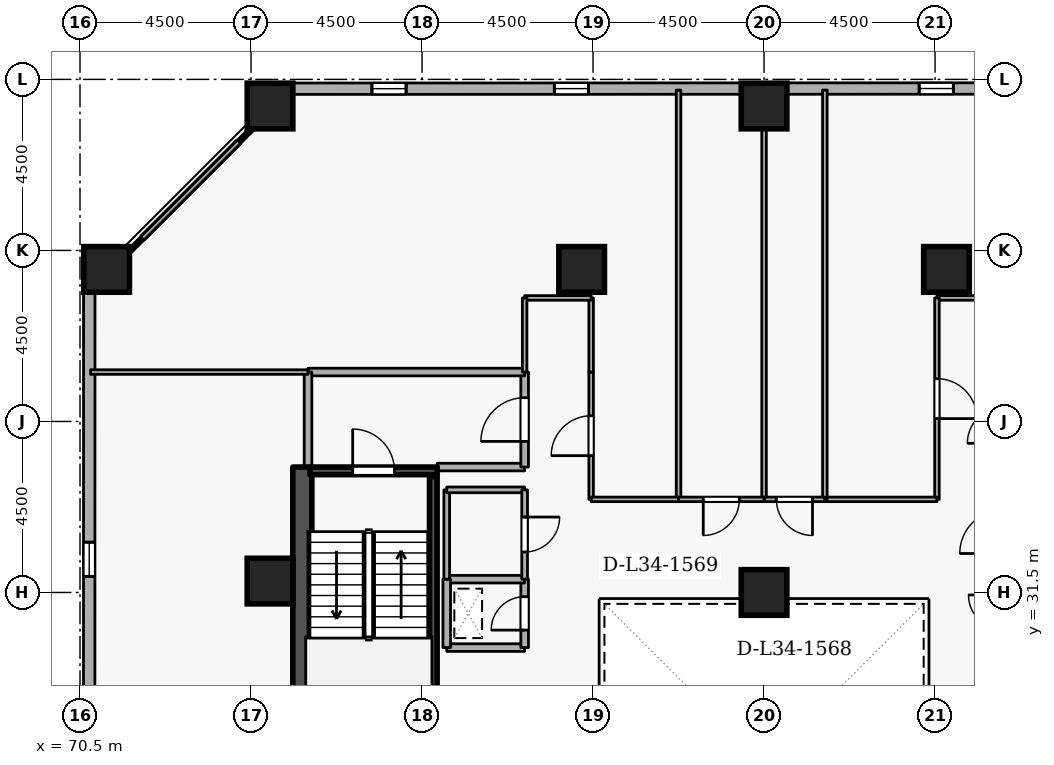
"""IFC4 building model, lengths in metres.
Left out: names, types, materials, properties, quantities, classifications, styles, units other than length and angle.
Written with IfcOpenShell. Run it as: python <this file> out.ifc"""

import sys

from ifc_helpers import new_model, si_unit, direction, frame, frame_2d, origin, origin_2d, place, context, subcontext, project, spatial, rectangle, extrude, element, fill, save


model = new_model("IFC4")
c1 = context("Model", 3, precision=1e-05, world=origin(), true_north=direction((0.0, 1.0)))
c2 = subcontext(c1, "Body", "Model", "MODEL_VIEW")
j1 = project(units=[si_unit("LENGTHUNIT", "METRE"), si_unit("PLANEANGLEUNIT", "RADIAN")], contexts=[c1])
p1 = place(None, origin())
s1 = spatial("IfcSite", under=j1, at=p1, CompositionType="ELEMENT")
p2 = place(p1, origin())
s2 = spatial("IfcBuilding", under=s1, at=p2, CompositionType="ELEMENT")
p3 = place(p2, frame((0.0, 0.0, 130.5)))
s3 = spatial("IfcBuildingStorey", under=s2, at=p3, CompositionType="ELEMENT", Elevation=130.5)
p4 = place(p3, frame((76.35, 19.2, 0.0), z_axis=(0.0, 0.0, 1.0), x_axis=(0.0, 1.0, 0.0)))
e1 = element("IfcWall", 1, at=p4, inside=s3, PredefinedType="SHEAR", context=c2, shape_type="SweptSolid", body=[
    extrude(rectangle(XDim=15.6, YDim=0.5, at=frame_2d((7.8, 0.0))), origin(), (0.0, 0.0, 1.0), 3.6),
])
for number, where, z_axis, x_axis in (
    (2, (88.5, 44.3, 0.0), (0.0, 0.0, 1.0), (1.0, 0.0, 0.0)),
    (3, (75.5, 44.3, 0.0), (0.0, 0.0, 1.0), (1.0, 0.0, 0.0)),
    (4, (71.2, 40.0, 0.0), (0.0, 0.0, 1.0), (1.0, 0.0, 0.0)),
    (5, (93.3, 40.0, 0.0), (0.0, 0.0, 1.0), (1.0, 0.0, 0.0)),
    (6, (83.7, 40.0, 0.0), (0.0, 0.0, 1.0), (1.0, 0.0, 0.0)),
    (7, (75.5, 31.8, 0.0), (0.0, 0.0, 1.0), (1.0, 0.0, 0.0)),
    (8, (88.5, 31.5, 0.0), (0.0, 0.0, 1.0), (1.0, 0.0, 0.0)),
):
    element("IfcColumn", number, at=place(p3, frame(where, z_axis=z_axis, x_axis=x_axis)), inside=s3, PredefinedType="COLUMN", context=c2, shape_type="SweptSolid", body=[
        extrude(rectangle(XDim=1.2, YDim=1.2, at=origin_2d()), origin(), (0.0, 0.0, 1.0), 3.6),
    ])
p5 = place(p3, frame((109.681, 44.765, 0.0), z_axis=(0.0, 0.0, 1.0), x_axis=(-0.999999963872, -0.000268805477, 0.0)))
e9 = element("IfcWall", 9, at=p5, inside=s3, PredefinedType="STANDARD", context=c2, shape_type="SweptSolid", body=[
    extrude(rectangle(XDim=33.605, YDim=0.3, at=frame_2d((16.802, 0.0))), origin(), (0.0, 0.0, 1.0), 2.7),
])
p6 = place(p5, frame((1.8, 0.0, 0.72)))
e10 = element("IfcOpeningElement", 10, at=p6, cuts=e9, PredefinedType="OPENING", context=c2, shape_type="SweptSolid", body=[
    extrude(rectangle(XDim=0.9, YDim=1.75, at=frame_2d((0.45, 0.875))), frame((0.0, 0.16, 0.0), z_axis=(0.0, -1.0, 0.0), x_axis=(1.0, 0.0, 0.0)), (0.0, 0.0, 1.0), 0.32),
])
p7 = place(p5, frame((11.4, 0.0, 0.72)))
e11 = element("IfcOpeningElement", 11, at=p7, cuts=e9, PredefinedType="OPENING", context=c2, shape_type="SweptSolid", body=[
    extrude(rectangle(XDim=0.9, YDim=1.75, at=frame_2d((0.45, 0.875))), frame((0.0, 0.16, 0.0), z_axis=(0.0, -1.0, 0.0), x_axis=(1.0, 0.0, 0.0)), (0.0, 0.0, 1.0), 0.32),
])
p8 = place(p5, frame((16.2, 0.0, 0.72)))
e12 = element("IfcOpeningElement", 12, at=p8, cuts=e9, PredefinedType="OPENING", context=c2, shape_type="SweptSolid", body=[
    extrude(rectangle(XDim=0.9, YDim=1.75, at=frame_2d((0.45, 0.875))), frame((0.0, 0.16, 0.0), z_axis=(0.0, -1.0, 0.0), x_axis=(1.0, 0.0, 0.0)), (0.0, 0.0, 1.0), 0.32),
])
p9 = place(p5, frame((25.8, 0.0, 0.72)))
e13 = element("IfcOpeningElement", 13, at=p9, cuts=e9, PredefinedType="OPENING", context=c2, shape_type="SweptSolid", body=[
    extrude(rectangle(XDim=0.9, YDim=1.75, at=frame_2d((0.45, 0.875))), frame((0.0, 0.16, 0.0), z_axis=(0.0, -1.0, 0.0), x_axis=(1.0, 0.0, 0.0)), (0.0, 0.0, 1.0), 0.32),
])
p10 = place(p5, frame((30.6, 0.0, 0.72)))
e14 = element("IfcOpeningElement", 14, at=p10, cuts=e9, PredefinedType="OPENING", context=c2, shape_type="SweptSolid", body=[
    extrude(rectangle(XDim=0.9, YDim=1.75, at=frame_2d((0.45, 0.875))), frame((0.0, 0.16, 0.0), z_axis=(0.0, -1.0, 0.0), x_axis=(1.0, 0.0, 0.0)), (0.0, 0.0, 1.0), 0.32),
])
p11 = place(p3, frame((70.744, 39.424, 0.0), z_axis=(0.0, 0.0, 1.0), x_axis=(-0.000268805477, -0.999999963872, 0.0)))
e15 = element("IfcWall", 15, at=p11, inside=s3, PredefinedType="STANDARD", context=c2, shape_type="SweptSolid", body=[
    extrude(rectangle(XDim=33.605, YDim=0.3, at=frame_2d((16.802, 0.0))), origin(), (0.0, 0.0, 1.0), 2.7),
])
p12 = place(p11, frame((6.6, 0.0, 0.72)))
e16 = element("IfcOpeningElement", 16, at=p12, cuts=e15, PredefinedType="OPENING", context=c2, shape_type="SweptSolid", body=[
    extrude(rectangle(XDim=0.9, YDim=1.75, at=frame_2d((0.45, 0.875))), frame((0.0, 0.16, 0.0), z_axis=(0.0, -1.0, 0.0), x_axis=(1.0, 0.0, 0.0)), (0.0, 0.0, 1.0), 0.32),
])
p13 = place(p11, frame((16.2, 0.0, 0.72)))
e17 = element("IfcOpeningElement", 17, at=p13, cuts=e15, PredefinedType="OPENING", context=c2, shape_type="SweptSolid", body=[
    extrude(rectangle(XDim=0.9, YDim=1.75, at=frame_2d((0.45, 0.875))), frame((0.0, 0.16, 0.0), z_axis=(0.0, -1.0, 0.0), x_axis=(1.0, 0.0, 0.0)), (0.0, 0.0, 1.0), 0.32),
])
p14 = place(p11, frame((21.0, 0.0, 0.72)))
e18 = element("IfcOpeningElement", 18, at=p14, cuts=e15, PredefinedType="OPENING", context=c2, shape_type="SweptSolid", body=[
    extrude(rectangle(XDim=0.9, YDim=1.75, at=frame_2d((0.45, 0.875))), frame((0.0, 0.16, 0.0), z_axis=(0.0, -1.0, 0.0), x_axis=(1.0, 0.0, 0.0)), (0.0, 0.0, 1.0), 0.32),
])
p15 = place(p11, frame((30.6, 0.0, 0.72)))
e19 = element("IfcOpeningElement", 19, at=p15, cuts=e15, PredefinedType="OPENING", context=c2, shape_type="SweptSolid", body=[
    extrude(rectangle(XDim=0.9, YDim=1.75, at=frame_2d((0.45, 0.875))), frame((0.0, 0.16, 0.0), z_axis=(0.0, -1.0, 0.0), x_axis=(1.0, 0.0, 0.0)), (0.0, 0.0, 1.0), 0.32),
])
p16 = place(p3, frame((76.55, 34.7, 0.0), z_axis=(0.0, 0.0, 1.0), x_axis=(1.0, 0.0, 0.0)))
e20 = element("IfcWall", 20, at=p16, inside=s3, PredefinedType="SHEAR", context=c2, shape_type="SweptSolid", body=[
    extrude(rectangle(XDim=3.35, YDim=0.2, at=frame_2d((1.675, 0.0))), origin(), (0.0, 0.0, 1.0), 3.6),
])
p17 = place(p16, frame((1.125, 0.0, 0.0)))
e21 = element("IfcOpeningElement", 21, at=p17, cuts=e20, PredefinedType="OPENING", context=c2, shape_type="SweptSolid", body=[
    extrude(rectangle(XDim=1.1, YDim=2.1, at=frame_2d((0.55, 1.05))), frame((0.0, 0.11, 0.0), z_axis=(0.0, -1.0, 0.0), x_axis=(1.0, 0.0, 0.0)), (0.0, 0.0, 1.0), 0.22),
])
p18 = place(p3, frame((79.797, 27.45, 0.0), z_axis=(0.0, 0.0, 1.0), x_axis=(0.0, 1.0, 0.0)))
e22 = element("IfcWall", 22, at=p18, inside=s3, PredefinedType="SHEAR", context=c2, shape_type="SweptSolid", body=[
    extrude(rectangle(XDim=7.1, YDim=0.2, at=frame_2d((3.55, 0.0))), origin(), (0.0, 0.0, 1.0), 3.6),
])
p19 = place(p3, frame((79.9, 34.8, 0.0), z_axis=(0.0, 0.0, 1.0), x_axis=(1.0, 0.0, 0.0)))
e23 = element("IfcWall", 23, at=p19, inside=s3, PredefinedType="STANDARD", context=c2, shape_type="SweptSolid", body=[
    extrude(rectangle(XDim=2.3, YDim=0.2, at=frame_2d((1.15, 0.0))), origin(), (0.0, 0.0, 1.0), 2.545),
])
p20 = place(p3, frame((82.2, 34.8, 0.0), z_axis=(0.0, 0.0, 1.0), x_axis=(0.0, 1.0, 0.0)))
e24 = element("IfcWall", 24, at=p20, inside=s3, PredefinedType="STANDARD", context=c2, shape_type="SweptSolid", body=[
    extrude(rectangle(XDim=2.5, YDim=0.2, at=frame_2d((1.25, 0.0))), origin(), (0.0, 0.0, 1.0), 3.34),
])
p21 = place(p20, frame((0.675, 0.0, 0.0)))
e25 = element("IfcOpeningElement", 25, at=p21, cuts=e24, PredefinedType="OPENING", context=c2, shape_type="SweptSolid", body=[
    extrude(rectangle(XDim=1.15, YDim=2.1, at=frame_2d((0.575, 1.05))), frame((0.0, 0.11, 0.0), z_axis=(0.0, -1.0, 0.0), x_axis=(1.0, 0.0, 0.0)), (0.0, 0.0, 1.0), 0.22),
])
p22 = place(p3, frame((82.2, 37.3, 0.0), z_axis=(0.0, 0.0, 1.0), x_axis=(-1.0, 0.0, 0.0)))
e26 = element("IfcWall", 26, at=p22, inside=s3, PredefinedType="STANDARD", context=c2, shape_type="SweptSolid", body=[
    extrude(rectangle(XDim=5.7, YDim=0.2, at=frame_2d((2.85, 0.0))), origin(), (0.0, 0.0, 1.0), 3.34),
])
p23 = place(p3, frame((76.5, 37.3, 0.0), z_axis=(0.0, 0.0, 1.0), x_axis=(0.0, -1.0, 0.0)))
e27 = element("IfcWall", 27, at=p23, inside=s3, PredefinedType="STANDARD", context=c2, shape_type="SweptSolid", body=[
    extrude(rectangle(XDim=2.5, YDim=0.2, at=frame_2d((1.25, 0.0))), origin(), (0.0, 0.0, 1.0), 3.34),
])
p24 = place(p3, frame((80.15, 30.05, 0.0), z_axis=(0.0, 0.0, 1.0), x_axis=(1.0, 0.0, 0.0)))
e28 = element("IfcWall", 28, at=p24, inside=s3, PredefinedType="STANDARD", context=c2, shape_type="SweptSolid", body=[
    extrude(rectangle(XDim=2.05, YDim=0.2, at=frame_2d((1.025, 0.0))), origin(), (0.0, 0.0, 1.0), 3.34),
])
p25 = place(p3, frame((82.2, 30.05, 0.0), z_axis=(0.0, 0.0, 1.0), x_axis=(0.0, 1.0, 0.0)))
e29 = element("IfcWall", 29, at=p25, inside=s3, PredefinedType="STANDARD", context=c2, shape_type="SweptSolid", body=[
    extrude(rectangle(XDim=1.8, YDim=0.2, at=frame_2d((0.9, 0.0))), origin(), (0.0, 0.0, 1.0), 3.34),
])
p26 = place(p25, frame((0.46, 0.0, 0.0)))
e30 = element("IfcOpeningElement", 30, at=p26, cuts=e29, PredefinedType="OPENING", context=c2, shape_type="SweptSolid", body=[
    extrude(rectangle(XDim=0.88, YDim=2.04, at=frame_2d((0.44, 1.02))), frame((0.0, 0.11, 0.0), z_axis=(0.0, -1.0, 0.0), x_axis=(1.0, 0.0, 0.0)), (0.0, 0.0, 1.0), 0.22),
])
p27 = place(p3, frame((82.2, 31.85, 0.0), z_axis=(0.0, 0.0, 1.0), x_axis=(-1.0, 0.0, 0.0)))
e31 = element("IfcWall", 31, at=p27, inside=s3, PredefinedType="STANDARD", context=c2, shape_type="SweptSolid", body=[
    extrude(rectangle(XDim=2.05, YDim=0.2, at=frame_2d((1.025, 0.0))), origin(), (0.0, 0.0, 1.0), 3.34),
])
p28 = place(p3, frame((80.15, 31.85, 0.0), z_axis=(0.0, 0.0, 1.0), x_axis=(0.0, -1.0, 0.0)))
e32 = element("IfcWall", 32, at=p28, inside=s3, PredefinedType="STANDARD", context=c2, shape_type="SweptSolid", body=[
    extrude(rectangle(XDim=1.8, YDim=0.2, at=frame_2d((0.9, 0.0))), origin(), (0.0, 0.0, 1.0), 3.34),
])
p29 = place(p3, frame((80.15, 31.85, 0.0), z_axis=(0.0, 0.0, 1.0), x_axis=(0.0, 1.0, 0.0)))
e33 = element("IfcWall", 33, at=p29, inside=s3, PredefinedType="PARTITIONING", context=c2, shape_type="SweptSolid", body=[
    extrude(rectangle(XDim=2.35, YDim=0.15, at=frame_2d((1.175, 0.0))), origin(), (0.0, 0.0, 1.0), 3.34),
])
p30 = place(p3, frame((80.15, 34.2, 0.0), z_axis=(0.0, 0.0, 1.0), x_axis=(1.0, 0.0, 0.0)))
e34 = element("IfcWall", 34, at=p30, inside=s3, PredefinedType="PARTITIONING", context=c2, shape_type="SweptSolid", body=[
    extrude(rectangle(XDim=2.05, YDim=0.15, at=frame_2d((1.025, 0.0))), origin(), (0.0, 0.0, 1.0), 2.545),
])
p31 = place(p3, frame((82.2, 34.2, 0.0), z_axis=(0.0, 0.0, 1.0), x_axis=(0.0, -1.0, 0.0)))
e35 = element("IfcWall", 35, at=p31, inside=s3, PredefinedType="PARTITIONING", context=c2, shape_type="SweptSolid", body=[
    extrude(rectangle(XDim=2.35, YDim=0.15, at=frame_2d((1.175, 0.0))), origin(), (0.0, 0.0, 1.0), 3.34),
])
p32 = place(p31, frame((0.715, 0.0, 0.0)))
e36 = element("IfcOpeningElement", 36, at=p32, cuts=e35, PredefinedType="OPENING", context=c2, shape_type="SweptSolid", body=[
    extrude(rectangle(XDim=0.92, YDim=2.08, at=frame_2d((0.46, 1.04))), frame((0.0, 0.085, 0.0), z_axis=(0.0, -1.0, 0.0), x_axis=(1.0, 0.0, 0.0)), (0.0, 0.0, 1.0), 0.17),
])
p33 = place(p3, frame((94.8, 39.25, 0.0), z_axis=(0.0, 0.0, 1.0), x_axis=(-1.0, 0.0, 0.0)))
e37 = element("IfcWall", 37, at=p33, inside=s3, PredefinedType="PARTITIONING", context=c2, shape_type="SweptSolid", body=[
    extrude(rectangle(XDim=1.75, YDim=0.12, at=frame_2d((0.875, 0.0))), origin(), (0.0, 0.0, 1.0), 3.34),
])
p34 = place(p3, frame((93.05, 39.25, 0.0), z_axis=(0.0, 0.0, 1.0), x_axis=(0.0, -1.0, 0.0)))
e38 = element("IfcWall", 38, at=p34, inside=s3, PredefinedType="PARTITIONING", context=c2, shape_type="SweptSolid", body=[
    extrude(rectangle(XDim=5.3, YDim=0.12, at=frame_2d((2.65, 0.0))), origin(), (0.0, 0.0, 1.0), 3.34),
])
p35 = place(p34, frame((2.125, 0.0, 0.0)))
e39 = element("IfcOpeningElement", 39, at=p35, cuts=e38, PredefinedType="OPENING", context=c2, shape_type="SweptSolid", body=[
    extrude(rectangle(XDim=1.05, YDim=2.1, at=frame_2d((0.525, 1.05))), frame((0.0, 0.07, 0.0), z_axis=(0.0, -1.0, 0.0), x_axis=(1.0, 0.0, 0.0)), (0.0, 0.0, 1.0), 0.14),
])
p36 = place(p3, frame((93.05, 33.95, 0.0), z_axis=(0.0, 0.0, 1.0), x_axis=(-1.0, 0.0, 0.0)))
e40 = element("IfcWall", 40, at=p36, inside=s3, PredefinedType="PARTITIONING", context=c2, shape_type="SweptSolid", body=[
    extrude(rectangle(XDim=2.95, YDim=0.12, at=frame_2d((1.475, 0.0))), origin(), (0.0, 0.0, 1.0), 3.34),
])
p37 = place(p3, frame((90.1, 33.95, 0.0), z_axis=(0.0, 0.0, 1.0), x_axis=(0.0, 1.0, 0.0)))
e41 = element("IfcWall", 41, at=p37, inside=s3, PredefinedType="PARTITIONING", context=c2, shape_type="SweptSolid", body=[
    extrude(rectangle(XDim=10.77, YDim=0.12, at=frame_2d((5.385, 0.0))), origin(), (0.0, 0.0, 1.0), 3.34),
])
p38 = place(p3, frame((88.5, 33.95, 0.0), z_axis=(0.0, 0.0, 1.0), x_axis=(0.0, 1.0, 0.0)))
e42 = element("IfcWall", 42, at=p38, inside=s3, PredefinedType="PARTITIONING", context=c2, shape_type="SweptSolid", body=[
    extrude(rectangle(XDim=10.77, YDim=0.12, at=frame_2d((5.385, 0.0))), origin(), (0.0, 0.0, 1.0), 2.878),
])
p39 = place(p3, frame((90.1, 33.95, 0.0), z_axis=(0.0, 0.0, 1.0), x_axis=(-1.0, 0.0, 0.0)))
e43 = element("IfcWall", 43, at=p39, inside=s3, PredefinedType="PARTITIONING", context=c2, shape_type="SweptSolid", body=[
    extrude(rectangle(XDim=1.6, YDim=0.12, at=frame_2d((0.8, 0.0))), origin(), (0.0, 0.0, 1.0), 3.34),
])
p40 = place(p39, frame((0.325, 0.0, 0.0)))
e44 = element("IfcOpeningElement", 44, at=p40, cuts=e43, PredefinedType="OPENING", context=c2, shape_type="SweptSolid", body=[
    extrude(rectangle(XDim=0.95, YDim=2.1, at=frame_2d((0.475, 1.05))), frame((0.0, 0.07, 0.0), z_axis=(0.0, -1.0, 0.0), x_axis=(1.0, 0.0, 0.0)), (0.0, 0.0, 1.0), 0.14),
])
p41 = place(p3, frame((86.25, 33.95, 0.0), z_axis=(0.0, 0.0, 1.0), x_axis=(0.0, 1.0, 0.0)))
e45 = element("IfcWall", 45, at=p41, inside=s3, PredefinedType="PARTITIONING", context=c2, shape_type="SweptSolid", body=[
    extrude(rectangle(XDim=10.77, YDim=0.12, at=frame_2d((5.385, 0.0))), origin(), (0.0, 0.0, 1.0), 3.34),
])
p42 = place(p3, frame((88.5, 33.95, 0.0), z_axis=(0.0, 0.0, 1.0), x_axis=(-1.0, 0.0, 0.0)))
e46 = element("IfcWall", 46, at=p42, inside=s3, PredefinedType="PARTITIONING", context=c2, shape_type="SweptSolid", body=[
    extrude(rectangle(XDim=2.25, YDim=0.12, at=frame_2d((1.125, 0.0))), origin(), (0.0, 0.0, 1.0), 3.34),
])
p43 = place(p42, frame((0.65, 0.0, 0.0)))
e47 = element("IfcOpeningElement", 47, at=p43, cuts=e46, PredefinedType="OPENING", context=c2, shape_type="SweptSolid", body=[
    extrude(rectangle(XDim=0.95, YDim=2.1, at=frame_2d((0.475, 1.05))), frame((0.0, 0.07, 0.0), z_axis=(0.0, -1.0, 0.0), x_axis=(1.0, 0.0, 0.0)), (0.0, 0.0, 1.0), 0.14),
])
p44 = place(p3, frame((83.95, 33.95, 0.0), z_axis=(0.0, 0.0, 1.0), x_axis=(0.0, 1.0, 0.0)))
e48 = element("IfcWall", 48, at=p44, inside=s3, PredefinedType="PARTITIONING", context=c2, shape_type="SweptSolid", body=[
    extrude(rectangle(XDim=3.35, YDim=0.12, at=frame_2d((1.675, 0.0))), origin(), (0.0, 0.0, 1.0), 3.34),
])
p45 = place(p44, frame((1.15, 0.0, 0.0)))
e49 = element("IfcOpeningElement", 49, at=p45, cuts=e48, PredefinedType="OPENING", context=c2, shape_type="SweptSolid", body=[
    extrude(rectangle(XDim=1.05, YDim=2.1, at=frame_2d((0.525, 1.05))), frame((0.0, 0.07, 0.0), z_axis=(0.0, -1.0, 0.0), x_axis=(1.0, 0.0, 0.0)), (0.0, 0.0, 1.0), 0.14),
])
p46 = place(p3, frame((83.95, 37.3, 0.0), z_axis=(0.0, 0.0, 1.0), x_axis=(0.0, 1.0, 0.0)))
e50 = element("IfcWall", 50, at=p46, inside=s3, PredefinedType="PARTITIONING", context=c2, shape_type="SweptSolid", body=[
    extrude(rectangle(XDim=1.95, YDim=0.12, at=frame_2d((0.975, 0.0))), origin(), (0.0, 0.0, 1.0), 3.34),
])
p47 = place(p3, frame((83.95, 39.25, 0.0), z_axis=(0.0, 0.0, 1.0), x_axis=(-1.0, 0.0, 0.0)))
e51 = element("IfcWall", 51, at=p47, inside=s3, PredefinedType="PARTITIONING", context=c2, shape_type="SweptSolid", body=[
    extrude(rectangle(XDim=1.75, YDim=0.12, at=frame_2d((0.875, 0.0))), origin(), (0.0, 0.0, 1.0), 3.34),
])
p48 = place(p3, frame((82.2, 39.25, 0.0), z_axis=(0.0, 0.0, 1.0), x_axis=(0.0, -1.0, 0.0)))
e52 = element("IfcWall", 52, at=p48, inside=s3, PredefinedType="PARTITIONING", context=c2, shape_type="SweptSolid", body=[
    extrude(rectangle(XDim=1.95, YDim=0.12, at=frame_2d((0.975, 0.0))), origin(), (0.0, 0.0, 1.0), 3.34),
])
p49 = place(p3, frame((76.5, 37.3, 0.0), z_axis=(0.0, 0.0, 1.0), x_axis=(-1.0, 0.0, 0.0)))
e53 = element("IfcWall", 53, at=p49, inside=s3, PredefinedType="PARTITIONING", context=c2, shape_type="SweptSolid", body=[
    extrude(rectangle(XDim=5.72, YDim=0.12, at=frame_2d((2.86, 0.0))), origin(), (0.0, 0.0, 1.0), 3.34),
])
p50 = place(p3, frame((70.78, 39.456, 0.0), z_axis=(0.0, 0.0, 1.0), x_axis=(0.707106781187, 0.707106781187, 0.0)))
e54 = element("IfcWall", 54, at=p50, inside=s3, PredefinedType="PARTITIONING", context=c2, shape_type="SweptSolid", body=[
    extrude(rectangle(XDim=7.444, YDim=0.12, at=frame_2d((3.722, 0.0))), origin(), (0.0, 0.0, 1.0), 3.34),
])
p51 = place(p3, frame((86.25, 33.95, 0.0), z_axis=(0.0, 0.0, 1.0), x_axis=(-1.0, 0.0, 0.0)))
e55 = element("IfcWall", 55, at=p51, inside=s3, PredefinedType="PARTITIONING", context=c2, shape_type="SweptSolid", body=[
    extrude(rectangle(XDim=2.3, YDim=0.12, at=frame_2d((1.15, 0.0))), origin(), (0.0, 0.0, 1.0), 3.34),
])
p52 = place(p8, origin())
e56 = element("IfcWindow", 56, at=p52, inside=s3, PartitioningType="SINGLE_PANEL", PredefinedType="WINDOW", context=c2, shape_type="SweptSolid", body=[
    extrude(rectangle(XDim=0.9, YDim=1.75, at=frame_2d((0.45, 0.875))), frame((0.0, 0.03, 0.0), z_axis=(0.0, -1.0, 0.0), x_axis=(1.0, 0.0, 0.0)), (0.0, 0.0, 1.0), 0.06),
])
fill(e12, e56)
p53 = place(p9, origin())
e57 = element("IfcWindow", 57, at=p53, inside=s3, PartitioningType="SINGLE_PANEL", PredefinedType="WINDOW", context=c2, shape_type="SweptSolid", body=[
    extrude(rectangle(XDim=0.9, YDim=1.75, at=frame_2d((0.45, 0.875))), frame((0.0, 0.03, 0.0), z_axis=(0.0, -1.0, 0.0), x_axis=(1.0, 0.0, 0.0)), (0.0, 0.0, 1.0), 0.06),
])
fill(e13, e57)
p54 = place(p10, origin())
e58 = element("IfcWindow", 58, at=p54, inside=s3, PartitioningType="SINGLE_PANEL", PredefinedType="WINDOW", context=c2, shape_type="SweptSolid", body=[
    extrude(rectangle(XDim=0.9, YDim=1.75, at=frame_2d((0.45, 0.875))), frame((0.0, 0.03, 0.0), z_axis=(0.0, -1.0, 0.0), x_axis=(1.0, 0.0, 0.0)), (0.0, 0.0, 1.0), 0.06),
])
fill(e14, e58)
p55 = place(p12, origin())
e59 = element("IfcWindow", 59, at=p55, inside=s3, PartitioningType="SINGLE_PANEL", PredefinedType="WINDOW", context=c2, shape_type="SweptSolid", body=[
    extrude(rectangle(XDim=0.9, YDim=1.75, at=frame_2d((0.45, 0.875))), frame((0.0, 0.03, 0.0), z_axis=(0.0, -1.0, 0.0), x_axis=(1.0, 0.0, 0.0)), (0.0, 0.0, 1.0), 0.06),
])
fill(e16, e59)
p56 = place(p17, origin())
e60 = element("IfcDoor", 60, at=p56, inside=s3, OperationType="SINGLE_SWING_LEFT", PredefinedType="DOOR", context=c2, shape_type="SweptSolid", body=[
    extrude(rectangle(XDim=1.1, YDim=2.1, at=frame_2d((0.55, 1.05))), frame((0.0, 0.025, 0.0), z_axis=(0.0, -1.0, 0.0), x_axis=(1.0, 0.0, 0.0)), (0.0, 0.0, 1.0), 0.05),
])
fill(e21, e60)
p57 = place(p21, origin())
e61 = element("IfcDoor", 61, at=p57, inside=s3, OperationType="SINGLE_SWING_LEFT", PredefinedType="DOOR", context=c2, shape_type="SweptSolid", body=[
    extrude(rectangle(XDim=1.15, YDim=2.1, at=frame_2d((0.575, 1.05))), frame((0.0, 0.025, 0.0), z_axis=(0.0, -1.0, 0.0), x_axis=(1.0, 0.0, 0.0)), (0.0, 0.0, 1.0), 0.05),
])
fill(e25, e61)
p58 = place(p26, origin())
e62 = element("IfcDoor", 62, at=p58, inside=s3, OperationType="SINGLE_SWING_LEFT", PredefinedType="DOOR", context=c2, shape_type="SweptSolid", body=[
    extrude(rectangle(XDim=0.88, YDim=2.04, at=frame_2d((0.44, 1.02))), frame((0.0, 0.025, 0.0), z_axis=(0.0, -1.0, 0.0), x_axis=(1.0, 0.0, 0.0)), (0.0, 0.0, 1.0), 0.05),
])
fill(e30, e62)
p59 = place(p32, origin())
e63 = element("IfcDoor", 63, at=p59, inside=s3, OperationType="SINGLE_SWING_LEFT", PredefinedType="DOOR", context=c2, shape_type="SweptSolid", body=[
    extrude(rectangle(XDim=0.92, YDim=2.08, at=frame_2d((0.46, 1.04))), frame((0.0, 0.025, 0.0), z_axis=(0.0, -1.0, 0.0), x_axis=(1.0, 0.0, 0.0)), (0.0, 0.0, 1.0), 0.05),
])
fill(e36, e63)
p60 = place(p35, origin())
e64 = element("IfcDoor", 64, at=p60, inside=s3, OperationType="SINGLE_SWING_RIGHT", PredefinedType="DOOR", context=c2, shape_type="SweptSolid", body=[
    extrude(rectangle(XDim=1.05, YDim=2.1, at=frame_2d((0.525, 1.05))), frame((0.0, 0.025, 0.0), z_axis=(0.0, -1.0, 0.0), x_axis=(1.0, 0.0, 0.0)), (0.0, 0.0, 1.0), 0.05),
])
fill(e39, e64)
p61 = place(p40, origin())
e65 = element("IfcDoor", 65, at=p61, inside=s3, OperationType="SINGLE_SWING_LEFT", PredefinedType="DOOR", context=c2, shape_type="SweptSolid", body=[
    extrude(rectangle(XDim=0.95, YDim=2.1, at=frame_2d((0.475, 1.05))), frame((0.0, 0.025, 0.0), z_axis=(0.0, -1.0, 0.0), x_axis=(1.0, 0.0, 0.0)), (0.0, 0.0, 1.0), 0.05),
])
fill(e44, e65)
p62 = place(p43, origin())
e66 = element("IfcDoor", 66, at=p62, inside=s3, OperationType="SINGLE_SWING_RIGHT", PredefinedType="DOOR", context=c2, shape_type="SweptSolid", body=[
    extrude(rectangle(XDim=0.95, YDim=2.1, at=frame_2d((0.475, 1.05))), frame((0.0, 0.025, 0.0), z_axis=(0.0, -1.0, 0.0), x_axis=(1.0, 0.0, 0.0)), (0.0, 0.0, 1.0), 0.05),
])
fill(e47, e66)
p63 = place(p45, origin())
e67 = element("IfcDoor", 67, at=p63, inside=s3, OperationType="SINGLE_SWING_LEFT", PredefinedType="DOOR", context=c2, shape_type="SweptSolid", body=[
    extrude(rectangle(XDim=1.05, YDim=2.1, at=frame_2d((0.525, 1.05))), frame((0.0, 0.025, 0.0), z_axis=(0.0, -1.0, 0.0), x_axis=(1.0, 0.0, 0.0)), (0.0, 0.0, 1.0), 0.05),
])
fill(e49, e67)
save(model, sys.argv[1])
